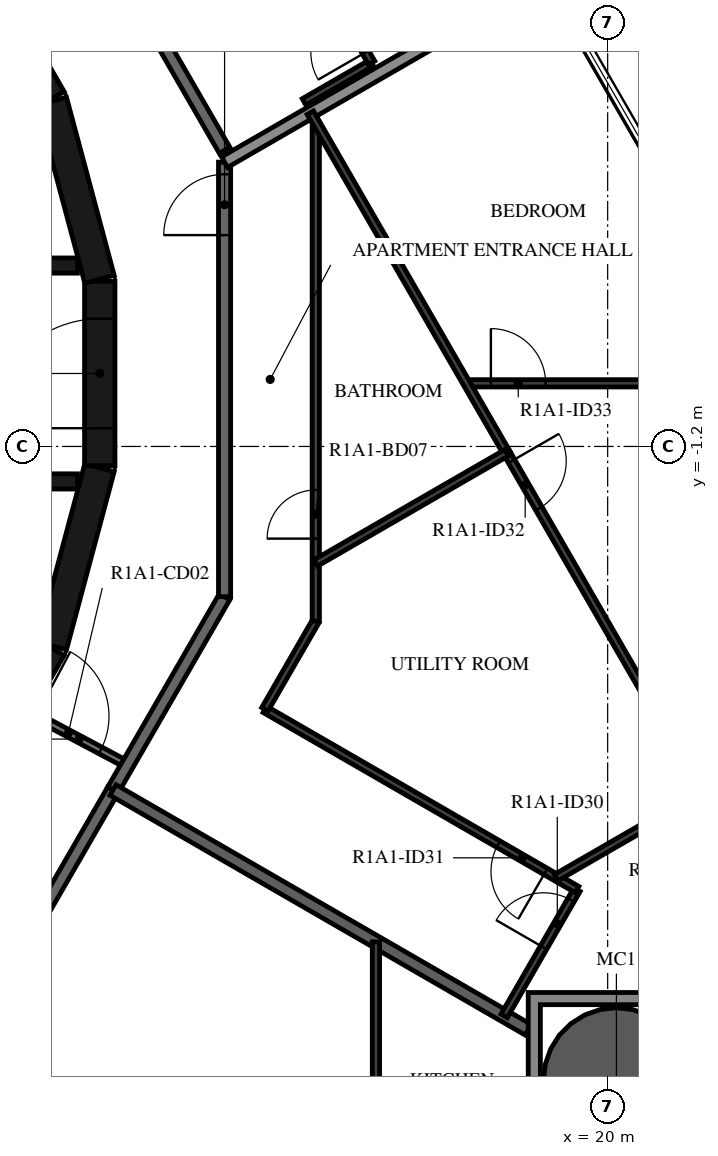
"""IFC4 building model, lengths in metres.
Left out: names, types, materials, properties, quantities, classifications, styles, units other than length and angle.
Written with IfcOpenShell. Run it as: python <this file> out.ifc"""

import sys

from ifc_helpers import new_model, si_unit, direction, frame, frame_2d, origin, origin_2d, place, context, subcontext, project, spatial, polyline, rectangle, hollow_circle, outline, extrude, element, fill, save


model = new_model("IFC4")
c1 = context("Model", 3, precision=1e-05, world=origin(), true_north=direction((0.0, 1.0)))
c2 = subcontext(c1, "Body", "Model", "MODEL_VIEW")
j1 = project(units=[si_unit("LENGTHUNIT", "METRE"), si_unit("PLANEANGLEUNIT", "RADIAN")], contexts=[c1])
p1 = place(None, origin())
s1 = spatial("IfcSite", under=j1, at=p1, CompositionType="ELEMENT")
p2 = place(p1, origin())
s2 = spatial("IfcBuilding", under=s1, at=p2, CompositionType="ELEMENT")
p3 = place(p2, frame((0.0, 0.0, 41.9)))
s3 = spatial("IfcBuildingStorey", under=s2, at=p3, CompositionType="ELEMENT", Elevation=41.9)
p4 = place(p3, frame((20.144, -11.63, -0.38), z_axis=(0.0, 0.0, 1.0), x_axis=(1.0, 0.0, 0.0)))
e1 = element("IfcColumn", 1, at=p4, inside=s3, PredefinedType="COLUMN", context=c2, shape_type="SweptSolid", body=[
    extrude(hollow_circle(Radius=1.2, WallThickness=0.06, at=origin_2d()), origin(), (0.0, 0.0, 1.0), 3.5),
])
for number, where, z_axis, x_axis in (
    (2, (9.329, -7.137, 0.0), (0.0, 0.0, 1.0), (0.5, 0.866, 0.0)),
    (3, (10.858, -4.479, 0.0), (0.0, 0.0, 1.0), (0.259, 0.966, 0.0)),
):
    element("IfcWall", number, at=place(p3, frame(where, z_axis=z_axis, x_axis=x_axis)), inside=s3, PredefinedType="SHEAR", context=c2, shape_type="SweptSolid", body=[
        extrude(rectangle(XDim=3.033, YDim=0.5, at=frame_2d((1.516, 0.0))), origin(), (0.0, 0.0, 1.0), 3.12),
    ])
p5 = place(p3, frame((11.647, -1.516, 0.0), z_axis=(0.0, 0.0, 1.0), x_axis=(0.0, 1.0, 0.0)))
e4 = element("IfcWall", 4, at=p5, inside=s3, PredefinedType="SHEAR", context=c2, shape_type="SweptSolid", body=[
    extrude(rectangle(XDim=3.033, YDim=0.5, at=frame_2d((1.516, 0.0))), origin(), (0.0, 0.0, 1.0), 3.12),
])
p6 = place(p5, frame((0.616, 0.0, 0.0)))
e5 = element("IfcOpeningElement", 5, at=p6, cuts=e4, PredefinedType="OPENING", context=c2, shape_type="SweptSolid", body=[
    extrude(rectangle(XDim=1.8, YDim=2.1, at=frame_2d((0.9, 1.05))), frame((0.0, 0.26, 0.0), z_axis=(0.0, -1.0, 0.0), x_axis=(1.0, 0.0, 0.0)), (0.0, 0.0, 1.0), 0.52),
])
for number, where, z_axis, x_axis in (
    (6, (11.643, 1.55, 0.0), (0.0, 0.0, 1.0), (-0.259, 0.966, 0.0)),
    (7, (10.845, 4.51, 0.0), (0.0, 0.0, 1.0), (-0.5, 0.866, 0.0)),
):
    element("IfcWall", number, at=place(p3, frame(where, z_axis=z_axis, x_axis=x_axis)), inside=s3, PredefinedType="SHEAR", context=c2, shape_type="SweptSolid", body=[
        extrude(rectangle(XDim=3.033, YDim=0.5, at=frame_2d((1.516, 0.0))), origin(), (0.0, 0.0, 1.0), 3.12),
    ])
p7 = place(p3, frame((3.35, 1.775, 0.0), z_axis=(0.0, 0.0, 1.0), x_axis=(1.0, 0.0, 0.0)))
e8 = element("IfcWall", 8, at=p7, inside=s3, PredefinedType="SHEAR", context=c2, shape_type="SweptSolid", body=[
    extrude(rectangle(XDim=7.93, YDim=0.25, at=frame_2d((3.965, 0.0))), origin(), (0.0, 0.0, 1.0), 3.12),
])
p8 = place(p7, frame((0.35, 0.0, 0.0)))
e9 = element("IfcOpeningElement", 9, at=p8, cuts=e8, PredefinedType="OPENING", context=c2, shape_type="SweptSolid", body=[
    extrude(rectangle(XDim=1.2, YDim=2.4, at=frame_2d((0.6, 1.2))), frame((0.0, 0.135, 0.0), z_axis=(0.0, -1.0, 0.0), x_axis=(1.0, 0.0, 0.0)), (0.0, 0.0, 1.0), 0.27),
])
p9 = place(p7, frame((2.5, 0.0, 0.0)))
e10 = element("IfcOpeningElement", 10, at=p9, cuts=e8, PredefinedType="OPENING", context=c2, shape_type="SweptSolid", body=[
    extrude(rectangle(XDim=1.2, YDim=2.4, at=frame_2d((0.6, 1.2))), frame((0.0, 0.135, 0.0), z_axis=(0.0, -1.0, 0.0), x_axis=(1.0, 0.0, 0.0)), (0.0, 0.0, 1.0), 0.27),
])
p10 = place(p7, frame((4.8, 0.0, 0.0)))
e11 = element("IfcOpeningElement", 11, at=p10, cuts=e8, PredefinedType="OPENING", context=c2, shape_type="SweptSolid", body=[
    extrude(rectangle(XDim=0.9, YDim=2.1, at=frame_2d((0.45, 1.05))), frame((0.0, 0.135, 0.0), z_axis=(0.0, -1.0, 0.0), x_axis=(1.0, 0.0, 0.0)), (0.0, 0.0, 1.0), 0.27),
])
p11 = place(p3, frame((3.35, -1.775, 0.0), z_axis=(0.0, 0.0, 1.0), x_axis=(1.0, 0.0, 0.0)))
e12 = element("IfcWall", 12, at=p11, inside=s3, PredefinedType="SHEAR", context=c2, shape_type="SweptSolid", body=[
    extrude(rectangle(XDim=7.93, YDim=0.25, at=frame_2d((3.965, 0.0))), origin(), (0.0, 0.0, 1.0), 3.12),
])
p12 = place(p11, frame((0.4, 0.0, 0.0)))
e13 = element("IfcOpeningElement", 13, at=p12, cuts=e12, PredefinedType="OPENING", context=c2, shape_type="SweptSolid", body=[
    extrude(rectangle(XDim=1.1, YDim=2.4, at=frame_2d((0.55, 1.2))), frame((0.0, 0.135, 0.0), z_axis=(0.0, -1.0, 0.0), x_axis=(1.0, 0.0, 0.0)), (0.0, 0.0, 1.0), 0.27),
])
p13 = place(p11, frame((2.55, 0.0, 0.0)))
e14 = element("IfcOpeningElement", 14, at=p13, cuts=e12, PredefinedType="OPENING", context=c2, shape_type="SweptSolid", body=[
    extrude(rectangle(XDim=1.1, YDim=2.4, at=frame_2d((0.55, 1.2))), frame((0.0, 0.135, 0.0), z_axis=(0.0, -1.0, 0.0), x_axis=(1.0, 0.0, 0.0)), (0.0, 0.0, 1.0), 0.27),
])
p14 = place(p11, frame((4.7, 0.0, 0.0)))
e15 = element("IfcOpeningElement", 15, at=p14, cuts=e12, PredefinedType="OPENING", context=c2, shape_type="SweptSolid", body=[
    extrude(rectangle(XDim=1.1, YDim=2.4, at=frame_2d((0.55, 1.2))), frame((0.0, 0.135, 0.0), z_axis=(0.0, -1.0, 0.0), x_axis=(1.0, 0.0, 0.0)), (0.0, 0.0, 1.0), 0.27),
])
p15 = place(p3, frame((10.511, -5.589, 0.0), z_axis=(0.0, 0.0, 1.0), x_axis=(0.88294043061, -0.469485032769, 0.0)))
e16 = element("IfcWall", 16, at=p15, inside=s3, PredefinedType="PARTITIONING", context=c2, shape_type="SweptSolid", body=[
    extrude(rectangle(XDim=1.804, YDim=0.12, at=frame_2d((0.902, 0.0))), origin(), (0.0, 0.0, 1.0), 3.12),
])
p16 = place(p15, frame((0.1, 0.0, 0.0)))
e17 = element("IfcOpeningElement", 17, at=p16, cuts=e16, PredefinedType="OPENING", context=c2, shape_type="SweptSolid", body=[
    extrude(rectangle(XDim=1.2, YDim=2.1, at=frame_2d((0.6, 1.05))), frame((0.0, 0.07, 0.0), z_axis=(0.0, -1.0, 0.0), x_axis=(1.0, 0.0, 0.0)), (0.0, 0.0, 1.0), 0.14),
])
p17 = place(p3, frame((13.7, 3.671, 0.0), z_axis=(0.0, 0.0, 1.0), x_axis=(-0.500001669485, 0.866024439905, 0.0)))
e18 = element("IfcWall", 18, at=p17, inside=s3, PredefinedType="STANDARD", context=c2, shape_type="SweptSolid", body=[
    extrude(rectangle(XDim=7.342, YDim=0.2, at=frame_2d((3.671, 0.0))), origin(), (0.0, 0.0, 1.0), 3.12),
])
p18 = place(p17, frame((6.142, 0.0, 0.0)))
e19 = element("IfcOpeningElement", 19, at=p18, cuts=e18, PredefinedType="OPENING", context=c2, shape_type="SweptSolid", body=[
    extrude(rectangle(XDim=1.0, YDim=2.1, at=frame_2d((0.5, 1.05))), frame((0.0, 0.11, 0.0), z_axis=(0.0, -1.0, 0.0), x_axis=(1.0, 0.0, 0.0)), (0.0, 0.0, 1.0), 0.22),
])
p19 = place(p3, frame((11.865, -6.849, 0.0), z_axis=(0.0, 0.0, 1.0), x_axis=(0.500002704028, 0.866023842607, 0.0)))
e20 = element("IfcWall", 20, at=p19, inside=s3, PredefinedType="STANDARD", context=c2, shape_type="SweptSolid", body=[
    extrude(rectangle(XDim=3.67, YDim=0.2, at=frame_2d((1.835, 0.0))), origin(), (0.0, 0.0, 1.0), 3.12),
])
p20 = place(p3, frame((13.7, -3.671, 0.0), z_axis=(0.0, 0.0, 1.0), x_axis=(0.0, 1.0, 0.0)))
e21 = element("IfcWall", 21, at=p20, inside=s3, PredefinedType="STANDARD", context=c2, shape_type="SweptSolid", body=[
    extrude(rectangle(XDim=7.146, YDim=0.2, at=frame_2d((3.573, 0.0))), origin(), (0.0, 0.0, 1.0), 3.12),
])
p21 = place(p20, frame((5.947, 0.0, 0.0)))
e22 = element("IfcOpeningElement", 22, at=p21, cuts=e21, PredefinedType="OPENING", context=c2, shape_type="SweptSolid", body=[
    extrude(rectangle(XDim=1.0, YDim=2.1, at=frame_2d((0.5, 1.05))), frame((0.0, 0.11, 0.0), z_axis=(0.0, -1.0, 0.0), x_axis=(1.0, 0.0, 0.0)), (0.0, 0.0, 1.0), 0.22),
])
p22 = place(p3, frame((10.029, -10.029, 0.0), z_axis=(0.0, 0.0, 1.0), x_axis=(0.50001606911, 0.866016126081, 0.0)))
e23 = element("IfcWall", 23, at=p22, inside=s3, PredefinedType="STANDARD", context=c2, shape_type="SweptSolid", body=[
    extrude(rectangle(XDim=3.671, YDim=0.2, at=frame_2d((1.835, 0.0))), origin(), (0.0, 0.0, 1.0), 3.12),
])
p23 = place(p3, frame((13.7, 3.476, 0.0), z_axis=(0.0, 0.0, 1.0), x_axis=(0.866013584312, 0.500020471368, 0.0)))
e24 = element("IfcWall", 24, at=p23, inside=s3, PredefinedType="STANDARD", context=c2, shape_type="SweptSolid", body=[
    extrude(rectangle(XDim=6.028, YDim=0.2, at=frame_2d((3.014, 0.0))), origin(), (0.0, 0.0, 1.0), 2.73),
])
p24 = place(p3, frame((18.694, -10.793, 0.0), z_axis=(0.0, 0.0, 1.0), x_axis=(-0.865964895271, 0.500104789178, 0.0)))
e25 = element("IfcWall", 25, at=p24, inside=s3, PredefinedType="STANDARD", context=c2, shape_type="SweptSolid", body=[
    extrude(rectangle(XDim=7.885, YDim=0.2, at=frame_2d((3.943, 0.0))), origin(), (0.0, 0.0, 1.0), 3.12),
])
p25 = place(p3, frame((15.007, 4.467, 0.0), z_axis=(0.0, 0.0, 1.0), x_axis=(0.86599869919, 0.500046250861, 0.0)))
e26 = element("IfcWall", 26, at=p25, inside=s3, PredefinedType="PARTITIONING", context=c2, shape_type="SweptSolid", body=[
    extrude(rectangle(XDim=1.284, YDim=0.12, at=frame_2d((0.642, 0.0))), origin(), (0.0, 0.0, 1.0), 3.12),
])
p26 = place(p3, frame((16.119, 5.109, 0.0), z_axis=(0.0, 0.0, 1.0), x_axis=(-0.499988222896, 0.866032203192, 0.0)))
e27 = element("IfcWall", 27, at=p26, inside=s3, PredefinedType="PARTITIONING", context=c2, shape_type="SweptSolid", body=[
    extrude(rectangle(XDim=4.4, YDim=0.12, at=frame_2d((2.2, 0.0))), origin(), (0.0, 0.0, 1.0), 3.12),
])
p27 = place(p26, frame((0.2, 0.0, 0.0)))
e28 = element("IfcOpeningElement", 28, at=p27, cuts=e27, PredefinedType="OPENING", context=c2, shape_type="SweptSolid", body=[
    extrude(rectangle(XDim=0.9, YDim=2.1, at=frame_2d((0.45, 1.05))), frame((0.0, 0.07, 0.0), z_axis=(0.0, -1.0, 0.0), x_axis=(1.0, 0.0, 0.0)), (0.0, 0.0, 1.0), 0.14),
])
p28 = place(p3, frame((16.189, -15.23, 0.0), z_axis=(0.0, 0.0, 1.0), x_axis=(0.0, 1.0, 0.0)))
e29 = element("IfcWall", 29, at=p28, inside=s3, PredefinedType="PARTITIONING", context=c2, shape_type="SweptSolid", body=[
    extrude(rectangle(XDim=5.883, YDim=0.12, at=frame_2d((2.942, 0.0))), origin(), (0.0, 0.0, 1.0), 3.12),
])
p29 = place(p28, frame((0.2, 0.0, 0.0)))
e30 = element("IfcOpeningElement", 30, at=p29, cuts=e29, PredefinedType="OPENING", context=c2, shape_type="SweptSolid", body=[
    extrude(rectangle(XDim=0.9, YDim=2.1, at=frame_2d((0.45, 1.05))), frame((0.0, 0.07, 0.0), z_axis=(0.0, -1.0, 0.0), x_axis=(1.0, 0.0, 0.0)), (0.0, 0.0, 1.0), 0.14),
])
p30 = place(p3, frame((18.298, -10.564, 0.0), z_axis=(0.0, 0.0, 1.0), x_axis=(0.499960392047, 0.866048270239, 0.0)))
e31 = element("IfcWall", 31, at=p30, inside=s3, PredefinedType="PARTITIONING", context=c2, shape_type="SweptSolid", body=[
    extrude(rectangle(XDim=2.398, YDim=0.12, at=frame_2d((1.199, 0.0))), origin(), (0.0, 0.0, 1.0), 3.12),
])
p31 = place(p30, frame((1.298, 0.0, 0.0)))
e32 = element("IfcOpeningElement", 32, at=p31, cuts=e31, PredefinedType="OPENING", context=c2, shape_type="SweptSolid", body=[
    extrude(rectangle(XDim=0.9, YDim=2.1, at=frame_2d((0.45, 1.05))), frame((0.0, 0.07, 0.0), z_axis=(0.0, -1.0, 0.0), x_axis=(1.0, 0.0, 0.0)), (0.0, 0.0, 1.0), 0.14),
])
p32 = place(p3, frame((19.497, -8.487, 0.0), z_axis=(0.0, 0.0, 1.0), x_axis=(-0.866027165828, 0.499996948039, 0.0)))
e33 = element("IfcWall", 33, at=p32, inside=s3, PredefinedType="PARTITIONING", context=c2, shape_type="SweptSolid", body=[
    extrude(rectangle(XDim=5.928, YDim=0.12, at=frame_2d((2.964, 0.0))), origin(), (0.0, 0.0, 1.0), 3.12),
])
p33 = place(p32, frame((0.595, 0.0, 0.0)))
e34 = element("IfcOpeningElement", 34, at=p33, cuts=e33, PredefinedType="OPENING", context=c2, shape_type="SweptSolid", body=[
    extrude(rectangle(XDim=0.9, YDim=2.1, at=frame_2d((0.45, 1.05))), frame((0.0, 0.07, 0.0), z_axis=(0.0, -1.0, 0.0), x_axis=(1.0, 0.0, 0.0)), (0.0, 0.0, 1.0), 0.14),
])
p34 = place(p3, frame((14.363, -5.523, 0.0), z_axis=(0.0, 0.0, 1.0), x_axis=(0.499995851058, 0.866027799164, 0.0)))
e35 = element("IfcWall", 35, at=p34, inside=s3, PredefinedType="PARTITIONING", context=c2, shape_type="SweptSolid", body=[
    extrude(rectangle(XDim=1.675, YDim=0.12, at=frame_2d((0.837, 0.0))), origin(), (0.0, 0.0, 1.0), 3.12),
])
p35 = place(p3, frame((15.2, -4.073, 0.0), z_axis=(0.0, 0.0, 1.0), x_axis=(0.0, 1.0, 0.0)))
e36 = element("IfcWall", 36, at=p35, inside=s3, PredefinedType="PARTITIONING", context=c2, shape_type="SweptSolid", body=[
    extrude(rectangle(XDim=8.146, YDim=0.12, at=frame_2d((4.073, 0.0))), origin(), (0.0, 0.0, 1.0), 3.12),
])
p36 = place(p35, frame((1.357, 0.0, 0.0)))
e37 = element("IfcOpeningElement", 37, at=p36, cuts=e36, PredefinedType="OPENING", context=c2, shape_type="SweptSolid", body=[
    extrude(rectangle(XDim=0.8, YDim=2.1, at=frame_2d((0.4, 1.05))), frame((0.0, 0.07, 0.0), z_axis=(0.0, -1.0, 0.0), x_axis=(1.0, 0.0, 0.0)), (0.0, 0.0, 1.0), 0.14),
])
p37 = place(p3, frame((17.679, -0.162, 0.0), z_axis=(0.0, 0.0, 1.0), x_axis=(1.0, 0.0, 0.0)))
e38 = element("IfcWall", 38, at=p37, inside=s3, PredefinedType="PARTITIONING", context=c2, shape_type="SweptSolid", body=[
    extrude(rectangle(XDim=5.081, YDim=0.12, at=frame_2d((2.54, 0.0))), origin(), (0.0, 0.0, 1.0), 3.12),
])
p38 = place(p37, frame((0.4, 0.0, 0.0)))
e39 = element("IfcOpeningElement", 39, at=p38, cuts=e38, PredefinedType="OPENING", context=c2, shape_type="SweptSolid", body=[
    extrude(rectangle(XDim=0.9, YDim=2.1, at=frame_2d((0.45, 1.05))), frame((0.0, 0.07, 0.0), z_axis=(0.0, -1.0, 0.0), x_axis=(1.0, 0.0, 0.0)), (0.0, 0.0, 1.0), 0.14),
])
p39 = place(p3, frame((15.11, 4.289, 0.0), z_axis=(0.0, 0.0, 1.0), x_axis=(0.500001702147, -0.866024421047, 0.0)))
e40 = element("IfcWall", 40, at=p39, inside=s3, PredefinedType="PARTITIONING", context=c2, shape_type="SweptSolid", body=[
    extrude(rectangle(XDim=6.458, YDim=0.12, at=frame_2d((3.229, 0.0))), origin(), (0.0, 0.0, 1.0), 3.12),
])
p40 = place(p3, frame((18.339, -1.303, 0.0), z_axis=(0.0, 0.0, 1.0), x_axis=(0.499989127021, -0.866031681211, 0.0)))
e41 = element("IfcWall", 41, at=p40, inside=s3, PredefinedType="PARTITIONING", context=c2, shape_type="SweptSolid", body=[
    extrude(rectangle(XDim=9.589, YDim=0.12, at=frame_2d((4.794, 0.0))), origin(), (0.0, 0.0, 1.0), 3.12),
])
p41 = place(p40, frame((0.16, 0.0, 0.0)))
e42 = element("IfcOpeningElement", 42, at=p41, cuts=e41, PredefinedType="OPENING", context=c2, shape_type="SweptSolid", body=[
    extrude(rectangle(XDim=0.9, YDim=2.1, at=frame_2d((0.45, 1.05))), frame((0.0, 0.07, 0.0), z_axis=(0.0, -1.0, 0.0), x_axis=(1.0, 0.0, 0.0)), (0.0, 0.0, 1.0), 0.14),
])
p42 = place(p40, frame((6.618, 0.0, 0.0)))
e43 = element("IfcOpeningElement", 43, at=p42, cuts=e41, PredefinedType="OPENING", context=c2, shape_type="SweptSolid", body=[
    extrude(rectangle(XDim=0.9, YDim=2.1, at=frame_2d((0.45, 1.05))), frame((0.0, 0.07, 0.0), z_axis=(0.0, -1.0, 0.0), x_axis=(1.0, 0.0, 0.0)), (0.0, 0.0, 1.0), 0.14),
])
p43 = place(p3, frame((21.568, -6.896, 0.0), z_axis=(0.0, 0.0, 1.0), x_axis=(-0.866029478545, -0.499992942241, 0.0)))
e44 = element("IfcWall", 44, at=p43, inside=s3, PredefinedType="PARTITIONING", context=c2, shape_type="SweptSolid", body=[
    extrude(rectangle(XDim=2.787, YDim=0.12, at=frame_2d((1.393, 0.0))), origin(), (0.0, 0.0, 1.0), 3.12),
])
p44 = place(p3, frame((18.339, -1.303, 0.0), z_axis=(0.0, 0.0, 1.0), x_axis=(-0.866037510713, -0.499979029598, 0.0)))
e45 = element("IfcWall", 45, at=p44, inside=s3, PredefinedType="PARTITIONING", context=c2, shape_type="SweptSolid", body=[
    extrude(rectangle(XDim=3.624, YDim=0.12, at=frame_2d((1.812, 0.0))), origin(), (0.0, 0.0, 1.0), 3.12),
])
p45 = place(p3, origin())
e46 = element("IfcWall", 46, at=p45, inside=s3, PredefinedType="STANDARD", context=c2, shape_type="SweptSolid", body=[
    extrude(outline(polyline([(21.594, -10.18), (21.594, -13.08), (18.694, -13.08), (18.694, -10.18), (21.594, -10.18)]), holes=[polyline([(18.894, -12.88), (21.394, -12.88), (21.394, -10.38), (18.894, -10.38), (18.894, -12.88)])]), origin(), (0.0, 0.0, 1.0), 3.12),
])
p46 = place(p6, origin())
e47 = element("IfcDoor", 47, at=p46, inside=s3, OperationType="DOUBLE_DOOR_SINGLE_SWING", PredefinedType="DOOR", context=c2, shape_type="SweptSolid", body=[
    extrude(rectangle(XDim=1.8, YDim=2.1, at=frame_2d((0.9, 1.05))), frame((0.0, 0.025, 0.0), z_axis=(0.0, -1.0, 0.0), x_axis=(1.0, 0.0, 0.0)), (0.0, 0.0, 1.0), 0.05),
])
fill(e5, e47)
p47 = place(p27, origin())
e48 = element("IfcDoor", 48, at=p47, inside=s3, OperationType="SINGLE_SWING_LEFT", PredefinedType="DOOR", context=c2, shape_type="SweptSolid", body=[
    extrude(rectangle(XDim=0.9, YDim=2.1, at=frame_2d((0.45, 1.05))), frame((0.0, 0.025, 0.0), z_axis=(0.0, -1.0, 0.0), x_axis=(1.0, 0.0, 0.0)), (0.0, 0.0, 1.0), 0.05),
])
fill(e28, e48)
p48 = place(p21, origin())
e49 = element("IfcDoor", 49, at=p48, inside=s3, OperationType="SINGLE_SWING_LEFT", PredefinedType="DOOR", context=c2, shape_type="SweptSolid", body=[
    extrude(rectangle(XDim=1.0, YDim=2.1, at=frame_2d((0.5, 1.05))), frame((0.0, 0.025, 0.0), z_axis=(0.0, -1.0, 0.0), x_axis=(1.0, 0.0, 0.0)), (0.0, 0.0, 1.0), 0.05),
])
fill(e22, e49)
p49 = place(p31, origin())
e50 = element("IfcDoor", 50, at=p49, inside=s3, OperationType="SINGLE_SWING_LEFT", PredefinedType="DOOR", context=c2, shape_type="SweptSolid", body=[
    extrude(rectangle(XDim=0.9, YDim=2.1, at=frame_2d((0.45, 1.05))), frame((0.0, 0.025, 0.0), z_axis=(0.0, -1.0, 0.0), x_axis=(1.0, 0.0, 0.0)), (0.0, 0.0, 1.0), 0.05),
])
fill(e32, e50)
p50 = place(p33, origin())
e51 = element("IfcDoor", 51, at=p50, inside=s3, OperationType="SINGLE_SWING_LEFT", PredefinedType="DOOR", context=c2, shape_type="SweptSolid", body=[
    extrude(rectangle(XDim=0.9, YDim=2.1, at=frame_2d((0.45, 1.05))), frame((0.0, 0.025, 0.0), z_axis=(0.0, -1.0, 0.0), x_axis=(1.0, 0.0, 0.0)), (0.0, 0.0, 1.0), 0.05),
])
fill(e34, e51)
p51 = place(p36, origin())
e52 = element("IfcDoor", 52, at=p51, inside=s3, OperationType="SINGLE_SWING_LEFT", PredefinedType="DOOR", context=c2, shape_type="SweptSolid", body=[
    extrude(rectangle(XDim=0.8, YDim=2.1, at=frame_2d((0.4, 1.05))), frame((0.0, 0.025, 0.0), z_axis=(0.0, -1.0, 0.0), x_axis=(1.0, 0.0, 0.0)), (0.0, 0.0, 1.0), 0.05),
])
fill(e37, e52)
p52 = place(p41, origin())
e53 = element("IfcDoor", 53, at=p52, inside=s3, OperationType="SINGLE_SWING_LEFT", PredefinedType="DOOR", context=c2, shape_type="SweptSolid", body=[
    extrude(rectangle(XDim=0.9, YDim=2.1, at=frame_2d((0.45, 1.05))), frame((0.0, 0.025, 0.0), z_axis=(0.0, -1.0, 0.0), x_axis=(1.0, 0.0, 0.0)), (0.0, 0.0, 1.0), 0.05),
])
fill(e42, e53)
p53 = place(p38, origin())
e54 = element("IfcDoor", 54, at=p53, inside=s3, OperationType="SINGLE_SWING_LEFT", PredefinedType="DOOR", context=c2, shape_type="SweptSolid", body=[
    extrude(rectangle(XDim=0.9, YDim=2.1, at=frame_2d((0.45, 1.05))), frame((0.0, 0.025, 0.0), z_axis=(0.0, -1.0, 0.0), x_axis=(1.0, 0.0, 0.0)), (0.0, 0.0, 1.0), 0.05),
])
fill(e39, e54)
p54 = place(p16, origin())
e55 = element("IfcDoor", 55, at=p54, inside=s3, OperationType="DOUBLE_DOOR_SINGLE_SWING", PredefinedType="DOOR", context=c2, shape_type="SweptSolid", body=[
    extrude(rectangle(XDim=1.2, YDim=2.1, at=frame_2d((0.6, 1.05))), frame((0.0, 0.025, 0.0), z_axis=(0.0, -1.0, 0.0), x_axis=(1.0, 0.0, 0.0)), (0.0, 0.0, 1.0), 0.05),
])
fill(e17, e55)
save(model, sys.argv[1])
